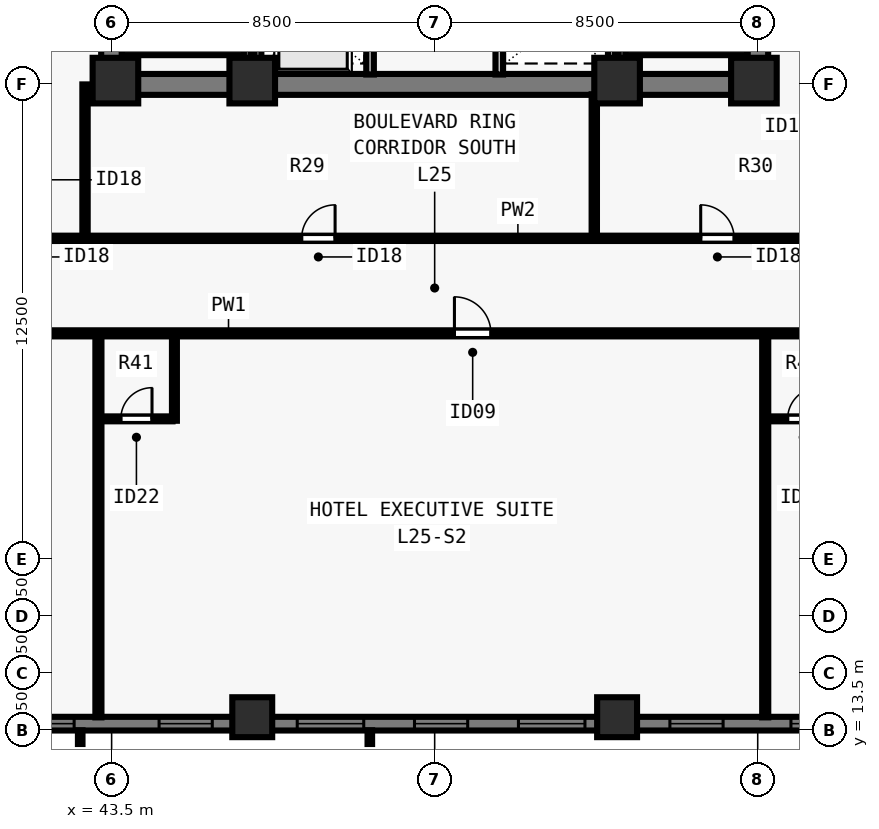
"""IFC4 building model, lengths in metres.
Left out: names, types, materials, properties, quantities, classifications, styles, units other than length and angle.
Written with IfcOpenShell. Run it as: python <this file> out.ifc"""

import sys

from ifc_helpers import new_model, si_unit, direction, frame, frame_2d, origin, origin_2d, place, context, subcontext, project, spatial, rectangle, extrude, element, fill, save


model = new_model("IFC4")
c1 = context("Model", 3, precision=1e-05, world=origin(), true_north=direction((0.0, 1.0)))
c2 = subcontext(c1, "Body", "Model", "MODEL_VIEW")
j1 = project(units=[si_unit("LENGTHUNIT", "METRE"), si_unit("PLANEANGLEUNIT", "RADIAN")], contexts=[c1])
p1 = place(None, origin())
s1 = spatial("IfcSite", under=j1, at=p1, CompositionType="ELEMENT")
p2 = place(p1, origin())
s2 = spatial("IfcBuilding", under=s1, at=p2, CompositionType="ELEMENT")
p3 = place(p2, frame((0.0, 0.0, 93.5)))
s3 = spatial("IfcBuildingStorey", under=s2, at=p3, CompositionType="ELEMENT", Elevation=93.5)
for number, where, z_axis, x_axis in (
    (1, (43.6, 30.6, 0.0), (0.0, 0.0, 1.0), (1.0, 0.0, 0.0)),
    (2, (47.2, 30.6, 0.0), (0.0, 0.0, 1.0), (1.0, 0.0, 0.0)),
    (3, (56.8, 30.6, 0.0), (0.0, 0.0, 1.0), (1.0, 0.0, 0.0)),
    (4, (60.4, 30.6, 0.0), (0.0, 0.0, 1.0), (1.0, 0.0, 0.0)),
):
    element("IfcColumn", number, at=place(p3, frame(where, z_axis=z_axis, x_axis=x_axis)), inside=s3, PredefinedType="COLUMN", context=c2, shape_type="SweptSolid", body=[
        extrude(rectangle(XDim=1.2, YDim=1.2, at=origin_2d()), origin(), (0.0, 0.0, 1.0), 3.5),
    ])
for number, where, z_axis, x_axis in (
    (5, (47.2, 13.85, 0.0), (0.0, 0.0, 1.0), (1.0, 0.0, 0.0)),
    (6, (56.8, 13.85, 0.0), (0.0, 0.0, 1.0), (1.0, 0.0, 0.0)),
):
    element("IfcColumn", number, at=place(p3, frame(where, z_axis=z_axis, x_axis=x_axis)), inside=s3, PredefinedType="COLUMN", context=c2, shape_type="SweptSolid", body=[
        extrude(rectangle(XDim=1.05, YDim=1.05, at=origin_2d()), origin(), (0.0, 0.0, 1.0), 3.5),
    ])
p4 = place(p3, frame((74.5, 13.68, 0.0), z_axis=(0.0, 0.0, 1.0), x_axis=(-1.0, 0.0, 0.0)))
e7 = element("IfcWall", 7, at=p4, inside=s3, PredefinedType="SOLIDWALL", context=c2, shape_type="SweptSolid", body=[
    extrude(rectangle(XDim=44.662, YDim=0.36, at=frame_2d((22.331, 0.0))), origin(), (0.0, 0.0, 1.0), 3.24),
])
p5 = place(p4, frame((4.655, 0.0, 0.8)))
e8 = element("IfcOpeningElement", 8, at=p5, cuts=e7, PredefinedType="OPENING", context=c2, shape_type="SweptSolid", body=[
    extrude(rectangle(XDim=1.75, YDim=1.504, at=frame_2d((0.875, 0.752))), frame((0.0, 0.19, 0.0), z_axis=(0.0, -1.0, 0.0), x_axis=(1.0, 0.0, 0.0)), (0.0, 0.0, 1.0), 0.38),
])
p6 = place(p4, frame((8.19, 0.0, 0.8)))
e9 = element("IfcOpeningElement", 9, at=p6, cuts=e7, PredefinedType="OPENING", context=c2, shape_type="SweptSolid", body=[
    extrude(rectangle(XDim=1.4, YDim=1.504, at=frame_2d((0.7, 0.752))), frame((0.0, 0.19, 0.0), z_axis=(0.0, -1.0, 0.0), x_axis=(1.0, 0.0, 0.0)), (0.0, 0.0, 1.0), 0.38),
])
p7 = place(p4, frame((11.375, 0.0, 0.8)))
e10 = element("IfcOpeningElement", 10, at=p7, cuts=e7, PredefinedType="OPENING", context=c2, shape_type="SweptSolid", body=[
    extrude(rectangle(XDim=1.75, YDim=1.504, at=frame_2d((0.875, 0.752))), frame((0.0, 0.19, 0.0), z_axis=(0.0, -1.0, 0.0), x_axis=(1.0, 0.0, 0.0)), (0.0, 0.0, 1.0), 0.38),
])
p8 = place(p4, frame((14.911, 0.0, 0.8)))
e11 = element("IfcOpeningElement", 11, at=p8, cuts=e7, PredefinedType="OPENING", context=c2, shape_type="SweptSolid", body=[
    extrude(rectangle(XDim=1.4, YDim=1.504, at=frame_2d((0.7, 0.752))), frame((0.0, 0.19, 0.0), z_axis=(0.0, -1.0, 0.0), x_axis=(1.0, 0.0, 0.0)), (0.0, 0.0, 1.0), 0.38),
])
p9 = place(p4, frame((18.546, 0.0, 0.8)))
e12 = element("IfcOpeningElement", 12, at=p9, cuts=e7, PredefinedType="OPENING", context=c2, shape_type="SweptSolid", body=[
    extrude(rectangle(XDim=1.75, YDim=1.504, at=frame_2d((0.875, 0.752))), frame((0.0, 0.19, 0.0), z_axis=(0.0, -1.0, 0.0), x_axis=(1.0, 0.0, 0.0)), (0.0, 0.0, 1.0), 0.38),
])
p10 = place(p4, frame((21.631, 0.0, 0.8)))
e13 = element("IfcOpeningElement", 13, at=p10, cuts=e7, PredefinedType="OPENING", context=c2, shape_type="SweptSolid", body=[
    extrude(rectangle(XDim=1.4, YDim=1.504, at=frame_2d((0.7, 0.752))), frame((0.0, 0.19, 0.0), z_axis=(0.0, -1.0, 0.0), x_axis=(1.0, 0.0, 0.0)), (0.0, 0.0, 1.0), 0.38),
])
p11 = place(p4, frame((24.366, 0.0, 0.8)))
e14 = element("IfcOpeningElement", 14, at=p11, cuts=e7, PredefinedType="OPENING", context=c2, shape_type="SweptSolid", body=[
    extrude(rectangle(XDim=1.75, YDim=1.504, at=frame_2d((0.875, 0.752))), frame((0.0, 0.19, 0.0), z_axis=(0.0, -1.0, 0.0), x_axis=(1.0, 0.0, 0.0)), (0.0, 0.0, 1.0), 0.38),
])
p12 = place(p4, frame((28.351, 0.0, 0.8)))
e15 = element("IfcOpeningElement", 15, at=p12, cuts=e7, PredefinedType="OPENING", context=c2, shape_type="SweptSolid", body=[
    extrude(rectangle(XDim=1.4, YDim=1.504, at=frame_2d((0.7, 0.752))), frame((0.0, 0.19, 0.0), z_axis=(0.0, -1.0, 0.0), x_axis=(1.0, 0.0, 0.0)), (0.0, 0.0, 1.0), 0.38),
])
p13 = place(p4, frame((31.987, 0.0, 0.8)))
e16 = element("IfcOpeningElement", 16, at=p13, cuts=e7, PredefinedType="OPENING", context=c2, shape_type="SweptSolid", body=[
    extrude(rectangle(XDim=1.75, YDim=1.504, at=frame_2d((0.875, 0.752))), frame((0.0, 0.19, 0.0), z_axis=(0.0, -1.0, 0.0), x_axis=(1.0, 0.0, 0.0)), (0.0, 0.0, 1.0), 0.38),
])
p14 = place(p4, frame((35.072, 0.0, 0.8)))
e17 = element("IfcOpeningElement", 17, at=p14, cuts=e7, PredefinedType="OPENING", context=c2, shape_type="SweptSolid", body=[
    extrude(rectangle(XDim=1.4, YDim=1.504, at=frame_2d((0.7, 0.752))), frame((0.0, 0.19, 0.0), z_axis=(0.0, -1.0, 0.0), x_axis=(1.0, 0.0, 0.0)), (0.0, 0.0, 1.0), 0.38),
])
p15 = place(p4, frame((38.257, 0.0, 0.8)))
e18 = element("IfcOpeningElement", 18, at=p15, cuts=e7, PredefinedType="OPENING", context=c2, shape_type="SweptSolid", body=[
    extrude(rectangle(XDim=1.75, YDim=1.504, at=frame_2d((0.875, 0.752))), frame((0.0, 0.19, 0.0), z_axis=(0.0, -1.0, 0.0), x_axis=(1.0, 0.0, 0.0)), (0.0, 0.0, 1.0), 0.38),
])
p16 = place(p3, frame((43.225, 30.5, 0.0), z_axis=(0.0, 0.0, 1.0), x_axis=(1.0, 0.0, 0.0)))
e19 = element("IfcWall", 19, at=p16, inside=s3, PredefinedType="SHEAR", context=c2, shape_type="SweptSolid", body=[
    extrude(rectangle(XDim=17.55, YDim=0.55, at=frame_2d((8.775, 0.0))), origin(), (0.0, 0.0, 1.0), 3.24),
])
for number, where, z_axis, x_axis in (
    (20, (43.5, 30.765, 0.0), (0.0, 0.0, 1.0), (0.0, 1.0, 0.0)),
    (21, (60.5, 30.765, 0.0), (0.0, 0.0, 1.0), (0.0, 1.0, 0.0)),
):
    element("IfcWall", number, at=place(p3, frame(where, z_axis=z_axis, x_axis=x_axis)), inside=s3, PredefinedType="SHEAR", context=c2, shape_type="SweptSolid", body=[
        extrude(rectangle(XDim=7.985, YDim=0.55, at=frame_2d((3.993, 0.0))), origin(), (0.0, 0.0, 1.0), 3.24),
    ])
p17 = place(p3, frame((50.3, 30.76, 0.0), z_axis=(0.0, 0.0, 1.0), x_axis=(0.0, 1.0, 0.0)))
e22 = element("IfcWall", 22, at=p17, inside=s3, PredefinedType="SOLIDWALL", context=c2, shape_type="SweptSolid", body=[
    extrude(rectangle(XDim=7.855, YDim=0.2, at=frame_2d((3.927, 0.0))), origin(), (0.0, 0.0, 1.0), 3.24),
])
p18 = place(p17, frame((0.79, 0.0, 0.0)))
e23 = element("IfcOpeningElement", 23, at=p18, cuts=e22, PredefinedType="OPENING", context=c2, shape_type="SweptSolid", body=[
    extrude(rectangle(XDim=1.1, YDim=2.2, at=frame_2d((0.55, 1.1))), frame((0.0, 0.11, 0.0), z_axis=(0.0, -1.0, 0.0), x_axis=(1.0, 0.0, 0.0)), (0.0, 0.0, 1.0), 0.22),
])
p19 = place(p17, frame((3.49, 0.0, 0.0)))
e24 = element("IfcOpeningElement", 24, at=p19, cuts=e22, PredefinedType="OPENING", context=c2, shape_type="SweptSolid", body=[
    extrude(rectangle(XDim=1.1, YDim=2.2, at=frame_2d((0.55, 1.1))), frame((0.0, 0.11, 0.0), z_axis=(0.0, -1.0, 0.0), x_axis=(1.0, 0.0, 0.0)), (0.0, 0.0, 1.0), 0.22),
])
p20 = place(p17, frame((6.19, 0.0, 0.0)))
e25 = element("IfcOpeningElement", 25, at=p20, cuts=e22, PredefinedType="OPENING", context=c2, shape_type="SweptSolid", body=[
    extrude(rectangle(XDim=1.1, YDim=2.2, at=frame_2d((0.55, 1.1))), frame((0.0, 0.11, 0.0), z_axis=(0.0, -1.0, 0.0), x_axis=(1.0, 0.0, 0.0)), (0.0, 0.0, 1.0), 0.22),
])
p21 = place(p3, frame((53.7, 30.76, 0.0), z_axis=(0.0, 0.0, 1.0), x_axis=(0.0, 1.0, 0.0)))
e26 = element("IfcWall", 26, at=p21, inside=s3, PredefinedType="SOLIDWALL", context=c2, shape_type="SweptSolid", body=[
    extrude(rectangle(XDim=7.855, YDim=0.2, at=frame_2d((3.927, 0.0))), origin(), (0.0, 0.0, 1.0), 3.24),
])
for number, where, z_axis, x_axis in (
    (27, (47.35, 30.76, 0.0), (0.0, 0.0, 1.0), (0.0, 1.0, 0.0)),
    (28, (56.65, 30.76, 0.0), (0.0, 0.0, 1.0), (0.0, 1.0, 0.0)),
):
    element("IfcWall", number, at=place(p3, frame(where, z_axis=z_axis, x_axis=x_axis)), inside=s3, PredefinedType="SOLIDWALL", context=c2, shape_type="SweptSolid", body=[
        extrude(rectangle(XDim=7.855, YDim=0.18, at=frame_2d((3.927, 0.0))), origin(), (0.0, 0.0, 1.0), 3.24),
    ])
p22 = place(p3, frame((37.1, 23.95, 0.0), z_axis=(0.0, 0.0, 1.0), x_axis=(1.0, 0.0, 0.0)))
e29 = element("IfcWall", 29, at=p22, inside=s3, PredefinedType="PARTITIONING", context=c2, shape_type="SweptSolid", body=[
    extrude(rectangle(XDim=29.8, YDim=0.16, at=frame_2d((14.9, 0.0))), origin(), (0.0, 0.0, 1.0), 3.24),
])
p23 = place(p22, frame((2.571, 0.0, 0.0)))
e30 = element("IfcOpeningElement", 30, at=p23, cuts=e29, PredefinedType="OPENING", context=c2, shape_type="SweptSolid", body=[
    extrude(rectangle(XDim=0.96, YDim=2.15, at=frame_2d((0.48, 1.075))), frame((0.0, 0.09, 0.0), z_axis=(0.0, -1.0, 0.0), x_axis=(1.0, 0.0, 0.0)), (0.0, 0.0, 1.0), 0.18),
])
p24 = place(p22, frame((15.42, 0.0, 0.0)))
e31 = element("IfcOpeningElement", 31, at=p24, cuts=e29, PredefinedType="OPENING", context=c2, shape_type="SweptSolid", body=[
    extrude(rectangle(XDim=0.96, YDim=2.15, at=frame_2d((0.48, 1.075))), frame((0.0, 0.09, 0.0), z_axis=(0.0, -1.0, 0.0), x_axis=(1.0, 0.0, 0.0)), (0.0, 0.0, 1.0), 0.18),
])
p25 = place(p22, frame((27.269, 0.0, 0.0)))
e32 = element("IfcOpeningElement", 32, at=p25, cuts=e29, PredefinedType="OPENING", context=c2, shape_type="SweptSolid", body=[
    extrude(rectangle(XDim=0.96, YDim=2.15, at=frame_2d((0.48, 1.075))), frame((0.0, 0.09, 0.0), z_axis=(0.0, -1.0, 0.0), x_axis=(1.0, 0.0, 0.0)), (0.0, 0.0, 1.0), 0.18),
])
p26 = place(p3, frame((39.6, 26.45, 0.0), z_axis=(0.0, 0.0, 1.0), x_axis=(1.0, 0.0, 0.0)))
e33 = element("IfcWall", 33, at=p26, inside=s3, PredefinedType="PARTITIONING", context=c2, shape_type="SweptSolid", body=[
    extrude(rectangle(XDim=24.8, YDim=0.14, at=frame_2d((12.4, 0.0))), origin(), (0.0, 0.0, 1.0), 3.24),
])
p27 = place(p26, frame((1.2, 0.0, 0.0)))
e34 = element("IfcOpeningElement", 34, at=p27, cuts=e33, PredefinedType="OPENING", context=c2, shape_type="SweptSolid", body=[
    extrude(rectangle(XDim=0.88, YDim=2.1, at=frame_2d((0.44, 1.05))), frame((0.0, 0.08, 0.0), z_axis=(0.0, -1.0, 0.0), x_axis=(1.0, 0.0, 0.0)), (0.0, 0.0, 1.0), 0.16),
])
p28 = place(p26, frame((8.9, 0.0, 0.0)))
e35 = element("IfcOpeningElement", 35, at=p28, cuts=e33, PredefinedType="OPENING", context=c2, shape_type="SweptSolid", body=[
    extrude(rectangle(XDim=0.88, YDim=2.1, at=frame_2d((0.44, 1.05))), frame((0.0, 0.08, 0.0), z_axis=(0.0, -1.0, 0.0), x_axis=(1.0, 0.0, 0.0)), (0.0, 0.0, 1.0), 0.16),
])
p29 = place(p26, frame((19.4, 0.0, 0.0)))
e36 = element("IfcOpeningElement", 36, at=p29, cuts=e33, PredefinedType="OPENING", context=c2, shape_type="SweptSolid", body=[
    extrude(rectangle(XDim=0.88, YDim=2.1, at=frame_2d((0.44, 1.05))), frame((0.0, 0.08, 0.0), z_axis=(0.0, -1.0, 0.0), x_axis=(1.0, 0.0, 0.0)), (0.0, 0.0, 1.0), 0.16),
])
p30 = place(p3, frame((42.8, 26.505, 0.0), z_axis=(0.0, 0.0, 1.0), x_axis=(0.0, 1.0, 0.0)))
e37 = element("IfcWall", 37, at=p30, inside=s3, PredefinedType="PARTITIONING", context=c2, shape_type="SweptSolid", body=[
    extrude(rectangle(XDim=3.995, YDim=0.14, at=frame_2d((1.998, 0.0))), origin(), (0.0, 0.0, 1.0), 2.399),
])
p31 = place(p3, frame((56.2, 26.505, 0.0), z_axis=(0.0, 0.0, 1.0), x_axis=(0.0, 1.0, 0.0)))
e38 = element("IfcWall", 38, at=p31, inside=s3, PredefinedType="PARTITIONING", context=c2, shape_type="SweptSolid", body=[
    extrude(rectangle(XDim=3.735, YDim=0.14, at=frame_2d((1.868, 0.0))), origin(), (0.0, 0.0, 1.0), 2.809),
])
p32 = place(p3, frame((43.153, 13.845, 0.0), z_axis=(0.0, 0.0, 1.0), x_axis=(0.0, 1.0, 0.0)))
e39 = element("IfcWall", 39, at=p32, inside=s3, PredefinedType="PARTITIONING", context=c2, shape_type="SweptSolid", body=[
    extrude(rectangle(XDim=10.04, YDim=0.16, at=frame_2d((5.02, 0.0))), origin(), (0.0, 0.0, 1.0), 3.24),
])
p33 = place(p3, frame((45.153, 21.65, 0.0), z_axis=(0.0, 0.0, 1.0), x_axis=(0.0, 1.0, 0.0)))
e40 = element("IfcWall", 40, at=p33, inside=s3, PredefinedType="PLUMBINGWALL", context=c2, shape_type="SweptSolid", body=[
    extrude(rectangle(XDim=2.235, YDim=0.13, at=frame_2d((1.118, 0.0))), origin(), (0.0, 0.0, 1.0), 3.24),
])
p34 = place(p3, frame((43.218, 21.7, 0.0), z_axis=(0.0, 0.0, 1.0), x_axis=(1.0, 0.0, 0.0)))
e41 = element("IfcWall", 41, at=p34, inside=s3, PredefinedType="PLUMBINGWALL", context=c2, shape_type="SweptSolid", body=[
    extrude(rectangle(XDim=1.885, YDim=0.13, at=frame_2d((0.942, 0.0))), origin(), (0.0, 0.0, 1.0), 3.24),
])
p35 = place(p34, frame((0.525, 0.0, 0.0)))
e42 = element("IfcOpeningElement", 42, at=p35, cuts=e41, PredefinedType="OPENING", context=c2, shape_type="SweptSolid", body=[
    extrude(rectangle(XDim=0.82, YDim=2.1, at=frame_2d((0.41, 1.05))), frame((0.0, 0.075, 0.0), z_axis=(0.0, -1.0, 0.0), x_axis=(1.0, 0.0, 0.0)), (0.0, 0.0, 1.0), 0.15),
])
p36 = place(p3, frame((60.698, 13.845, 0.0), z_axis=(0.0, 0.0, 1.0), x_axis=(0.0, 1.0, 0.0)))
e43 = element("IfcWall", 43, at=p36, inside=s3, PredefinedType="PARTITIONING", context=c2, shape_type="SweptSolid", body=[
    extrude(rectangle(XDim=10.04, YDim=0.16, at=frame_2d((5.02, 0.0))), origin(), (0.0, 0.0, 1.0), 3.24),
])
p37 = place(p3, frame((60.762, 21.7, 0.0), z_axis=(0.0, 0.0, 1.0), x_axis=(1.0, 0.0, 0.0)))
e44 = element("IfcWall", 44, at=p37, inside=s3, PredefinedType="PLUMBINGWALL", context=c2, shape_type="SweptSolid", body=[
    extrude(rectangle(XDim=1.885, YDim=0.13, at=frame_2d((0.942, 0.0))), origin(), (0.0, 0.0, 1.0), 3.24),
])
p38 = place(p37, frame((0.525, 0.0, 0.0)))
e45 = element("IfcOpeningElement", 45, at=p38, cuts=e44, PredefinedType="OPENING", context=c2, shape_type="SweptSolid", body=[
    extrude(rectangle(XDim=0.82, YDim=2.1, at=frame_2d((0.41, 1.05))), frame((0.0, 0.075, 0.0), z_axis=(0.0, -1.0, 0.0), x_axis=(1.0, 0.0, 0.0)), (0.0, 0.0, 1.0), 0.15),
])
p39 = place(p3, frame((43.765, 31.36, 0.0), z_axis=(0.0, 0.0, 1.0), x_axis=(1.0, 0.0, 0.0)))
e46 = element("IfcWall", 46, at=p39, inside=s3, PredefinedType="SOLIDWALL", context=c2, shape_type="SweptSolid", body=[
    extrude(rectangle(XDim=3.23, YDim=0.18, at=frame_2d((1.615, 0.0))), origin(), (0.0, 0.0, 1.0), 3.24),
])
p40 = place(p3, frame((47.07, 38.78, 0.0), z_axis=(0.0, 0.0, 1.0), x_axis=(0.0, -1.0, 0.0)))
e47 = element("IfcWall", 47, at=p40, inside=s3, PredefinedType="SOLIDWALL", context=c2, shape_type="SweptSolid", body=[
    extrude(rectangle(XDim=8.017, YDim=0.18, at=frame_2d((4.009, 0.0))), origin(), (0.0, 0.0, 1.0), 3.24),
])
p41 = place(p3, frame((57.005, 31.36, 0.0), z_axis=(0.0, 0.0, 1.0), x_axis=(1.0, 0.0, 0.0)))
e48 = element("IfcWall", 48, at=p41, inside=s3, PredefinedType="SOLIDWALL", context=c2, shape_type="SweptSolid", body=[
    extrude(rectangle(XDim=3.23, YDim=0.18, at=frame_2d((1.615, 0.0))), origin(), (0.0, 0.0, 1.0), 3.24),
])
p42 = place(p3, frame((56.93, 38.78, 0.0), z_axis=(0.0, 0.0, 1.0), x_axis=(0.0, -1.0, 0.0)))
e49 = element("IfcWall", 49, at=p42, inside=s3, PredefinedType="SOLIDWALL", context=c2, shape_type="SweptSolid", body=[
    extrude(rectangle(XDim=8.017, YDim=0.18, at=frame_2d((4.009, 0.0))), origin(), (0.0, 0.0, 1.0), 3.24),
])
p43 = place(p7, origin())
e50 = element("IfcWindow", 50, at=p43, inside=s3, PartitioningType="SINGLE_PANEL", PredefinedType="WINDOW", context=c2, shape_type="SweptSolid", body=[
    extrude(rectangle(XDim=1.75, YDim=1.504, at=frame_2d((0.875, 0.752))), frame((0.0, -0.05, 0.0), z_axis=(0.0, -1.0, 0.0), x_axis=(1.0, 0.0, 0.0)), (0.0, 0.0, 1.0), 0.06),
])
fill(e10, e50)
p44 = place(p8, origin())
e51 = element("IfcWindow", 51, at=p44, inside=s3, PartitioningType="SINGLE_PANEL", PredefinedType="WINDOW", context=c2, shape_type="SweptSolid", body=[
    extrude(rectangle(XDim=1.4, YDim=1.504, at=frame_2d((0.7, 0.752))), frame((0.0, -0.05, 0.0), z_axis=(0.0, -1.0, 0.0), x_axis=(1.0, 0.0, 0.0)), (0.0, 0.0, 1.0), 0.06),
])
fill(e11, e51)
p45 = place(p9, origin())
e52 = element("IfcWindow", 52, at=p45, inside=s3, PartitioningType="SINGLE_PANEL", PredefinedType="WINDOW", context=c2, shape_type="SweptSolid", body=[
    extrude(rectangle(XDim=1.75, YDim=1.504, at=frame_2d((0.875, 0.752))), frame((0.0, -0.05, 0.0), z_axis=(0.0, -1.0, 0.0), x_axis=(1.0, 0.0, 0.0)), (0.0, 0.0, 1.0), 0.06),
])
fill(e12, e52)
p46 = place(p10, origin())
e53 = element("IfcWindow", 53, at=p46, inside=s3, PartitioningType="SINGLE_PANEL", PredefinedType="WINDOW", context=c2, shape_type="SweptSolid", body=[
    extrude(rectangle(XDim=1.4, YDim=1.504, at=frame_2d((0.7, 0.752))), frame((0.0, -0.05, 0.0), z_axis=(0.0, -1.0, 0.0), x_axis=(1.0, 0.0, 0.0)), (0.0, 0.0, 1.0), 0.06),
])
fill(e13, e53)
p47 = place(p11, origin())
e54 = element("IfcWindow", 54, at=p47, inside=s3, PartitioningType="SINGLE_PANEL", PredefinedType="WINDOW", context=c2, shape_type="SweptSolid", body=[
    extrude(rectangle(XDim=1.75, YDim=1.504, at=frame_2d((0.875, 0.752))), frame((0.0, -0.05, 0.0), z_axis=(0.0, -1.0, 0.0), x_axis=(1.0, 0.0, 0.0)), (0.0, 0.0, 1.0), 0.06),
])
fill(e14, e54)
p48 = place(p12, origin())
e55 = element("IfcWindow", 55, at=p48, inside=s3, PartitioningType="SINGLE_PANEL", PredefinedType="WINDOW", context=c2, shape_type="SweptSolid", body=[
    extrude(rectangle(XDim=1.4, YDim=1.504, at=frame_2d((0.7, 0.752))), frame((0.0, -0.05, 0.0), z_axis=(0.0, -1.0, 0.0), x_axis=(1.0, 0.0, 0.0)), (0.0, 0.0, 1.0), 0.06),
])
fill(e15, e55)
p49 = place(p13, origin())
e56 = element("IfcWindow", 56, at=p49, inside=s3, PartitioningType="SINGLE_PANEL", PredefinedType="WINDOW", context=c2, shape_type="SweptSolid", body=[
    extrude(rectangle(XDim=1.75, YDim=1.504, at=frame_2d((0.875, 0.752))), frame((0.0, -0.05, 0.0), z_axis=(0.0, -1.0, 0.0), x_axis=(1.0, 0.0, 0.0)), (0.0, 0.0, 1.0), 0.06),
])
fill(e16, e56)
p50 = place(p28, origin())
e57 = element("IfcDoor", 57, at=p50, inside=s3, OperationType="SINGLE_SWING_RIGHT", PredefinedType="DOOR", context=c2, shape_type="SweptSolid", body=[
    extrude(rectangle(XDim=0.88, YDim=2.1, at=frame_2d((0.44, 1.05))), frame((0.0, 0.025, 0.0), z_axis=(0.0, -1.0, 0.0), x_axis=(1.0, 0.0, 0.0)), (0.0, 0.0, 1.0), 0.05),
])
fill(e35, e57)
p51 = place(p29, origin())
e58 = element("IfcDoor", 58, at=p51, inside=s3, OperationType="SINGLE_SWING_LEFT", PredefinedType="DOOR", context=c2, shape_type="SweptSolid", body=[
    extrude(rectangle(XDim=0.88, YDim=2.1, at=frame_2d((0.44, 1.05))), frame((0.0, 0.025, 0.0), z_axis=(0.0, -1.0, 0.0), x_axis=(1.0, 0.0, 0.0)), (0.0, 0.0, 1.0), 0.05),
])
fill(e36, e58)
p52 = place(p35, origin())
e59 = element("IfcDoor", 59, at=p52, inside=s3, OperationType="SINGLE_SWING_RIGHT", PredefinedType="DOOR", context=c2, shape_type="SweptSolid", body=[
    extrude(rectangle(XDim=0.82, YDim=2.1, at=frame_2d((0.41, 1.05))), frame((0.0, 0.025, 0.0), z_axis=(0.0, -1.0, 0.0), x_axis=(1.0, 0.0, 0.0)), (0.0, 0.0, 1.0), 0.05),
])
fill(e42, e59)
p53 = place(p24, origin())
e60 = element("IfcDoor", 60, at=p53, inside=s3, OperationType="SINGLE_SWING_LEFT", PredefinedType="DOOR", context=c2, shape_type="SweptSolid", body=[
    extrude(rectangle(XDim=0.96, YDim=2.15, at=frame_2d((0.48, 1.075))), frame((0.0, 0.025, 0.0), z_axis=(0.0, -1.0, 0.0), x_axis=(1.0, 0.0, 0.0)), (0.0, 0.0, 1.0), 0.05),
])
fill(e31, e60)
p54 = place(p38, origin())
e61 = element("IfcDoor", 61, at=p54, inside=s3, OperationType="SINGLE_SWING_RIGHT", PredefinedType="DOOR", context=c2, shape_type="SweptSolid", body=[
    extrude(rectangle(XDim=0.82, YDim=2.1, at=frame_2d((0.41, 1.05))), frame((0.0, 0.025, 0.0), z_axis=(0.0, -1.0, 0.0), x_axis=(1.0, 0.0, 0.0)), (0.0, 0.0, 1.0), 0.05),
])
fill(e45, e61)
save(model, sys.argv[1])
